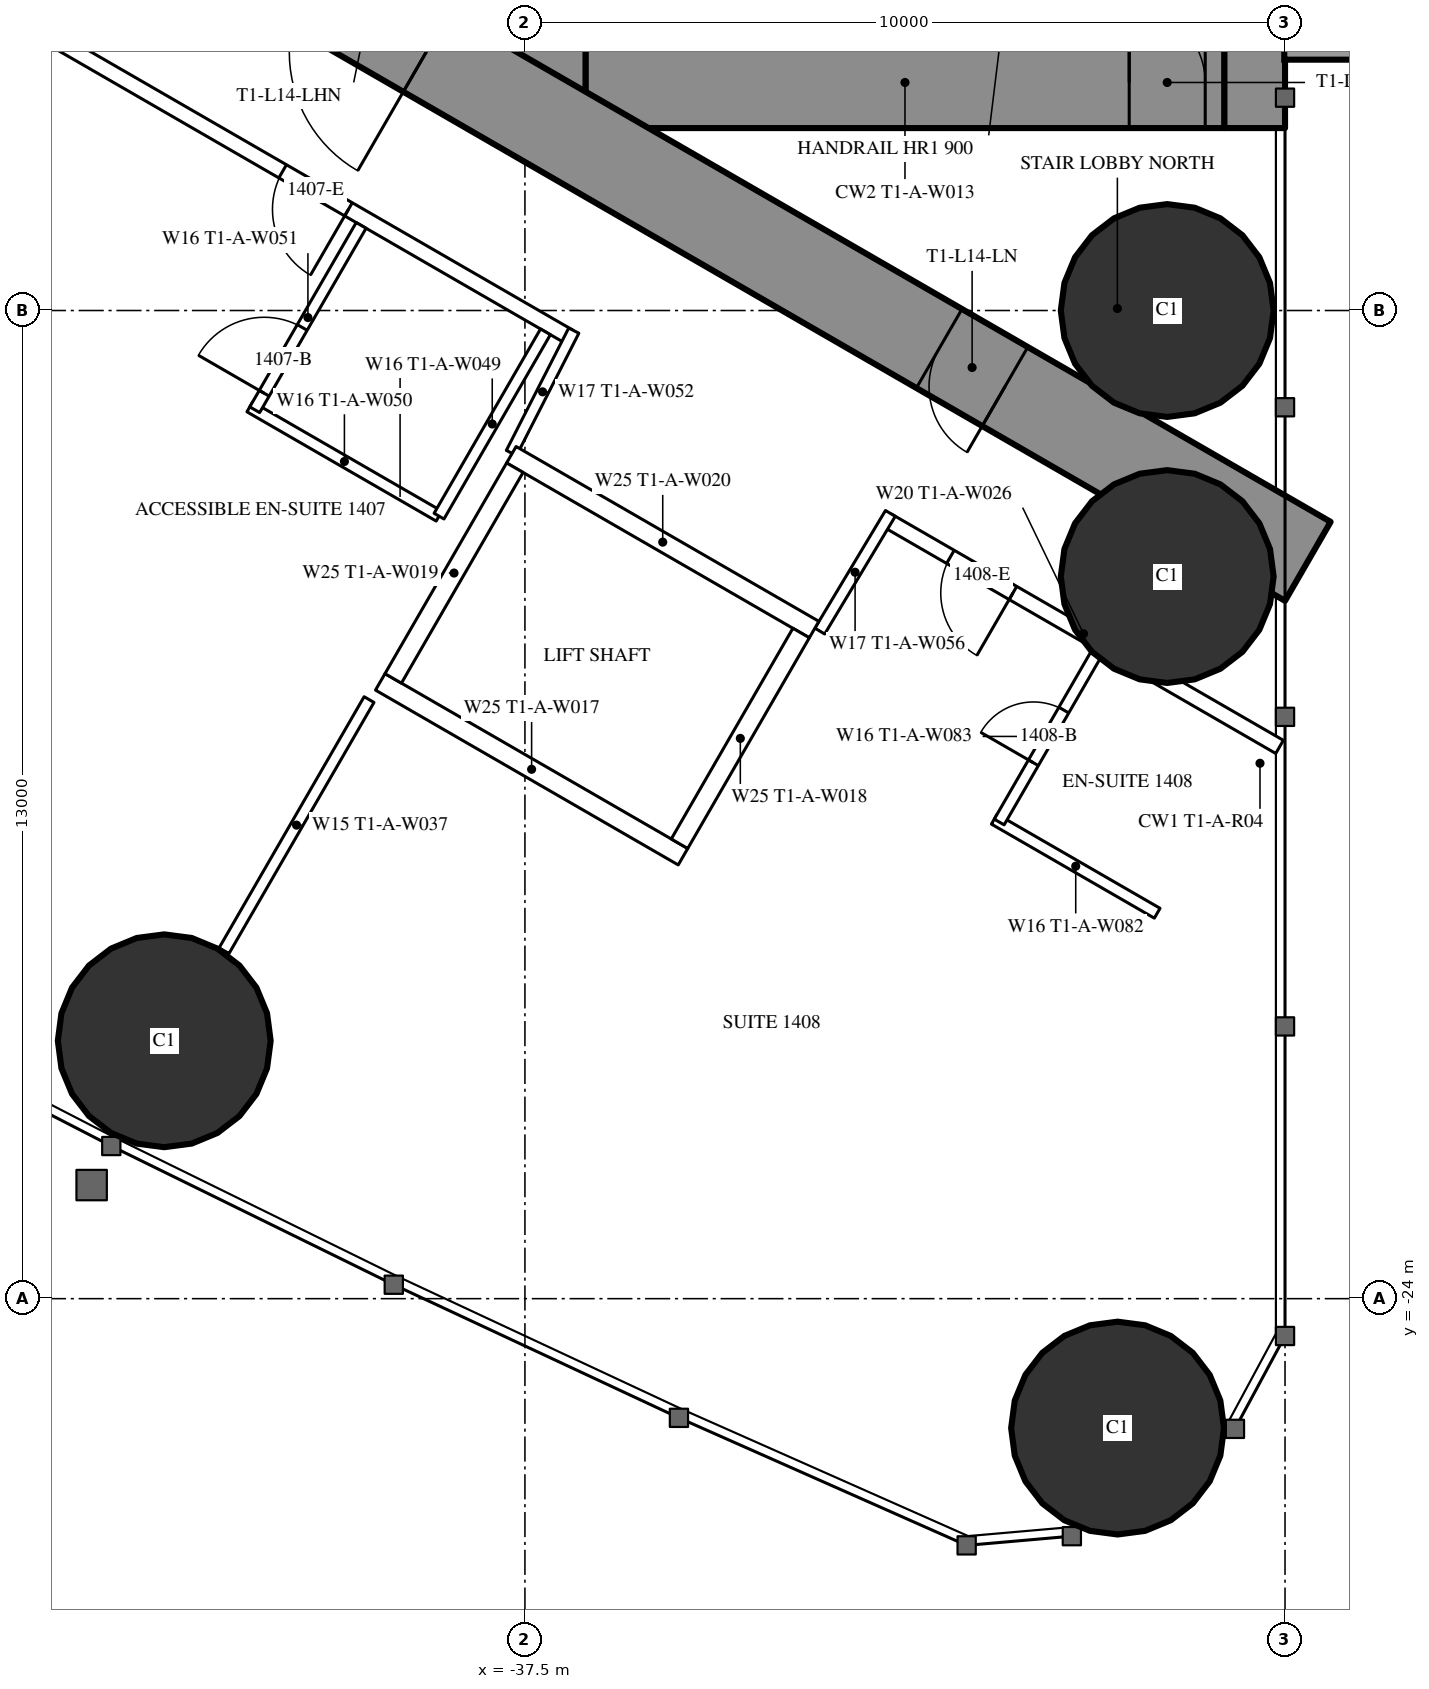
"""IFC4 building model, lengths in metres.
Left out: names, types, materials, properties, quantities, classifications, styles, units other than length and angle.
Written with IfcOpenShell. Run it as: python <this file> out.ifc"""

import sys

from ifc_helpers import new_model, si_unit, direction, frame, frame_2d, origin, origin_2d, place, context, subcontext, project, spatial, rectangle, hollow_circle, extrude, element, fill, save


model = new_model("IFC4")
c1 = context("Model", 3, precision=1e-05, world=origin(), true_north=direction((0.0, 1.0)))
c2 = subcontext(c1, "Body", "Model", "MODEL_VIEW")
j1 = project(units=[si_unit("LENGTHUNIT", "METRE"), si_unit("PLANEANGLEUNIT", "RADIAN")], contexts=[c1])
p1 = place(None, origin())
s1 = spatial("IfcSite", under=j1, at=p1, CompositionType="ELEMENT")
p2 = place(p1, origin())
s2 = spatial("IfcBuilding", under=s1, at=p2, CompositionType="ELEMENT")
p3 = place(p2, frame((0.0, 0.0, 56.5)))
s3 = spatial("IfcBuildingStorey", under=s2, at=p3, CompositionType="ELEMENT", Elevation=56.5)
for number, where, z_axis, x_axis in (
    (1, (-29.703, -25.703, 0.0), (0.0, 0.0, 1.0), (1.0, 0.0, 0.0)),
    (2, (-29.05, -11.0, 0.0), (0.0, 0.0, 1.0), (1.0, 0.0, 0.0)),
    (3, (-29.05, -14.5, 0.0), (0.0, 0.0, 1.0), (1.0, 0.0, 0.0)),
    (4, (-42.245, -20.607, 0.0), (0.0, 0.0, 1.0), (1.0, 0.0, 0.0)),
):
    element("IfcColumn", number, at=place(p3, frame(where, z_axis=z_axis, x_axis=x_axis)), inside=s3, PredefinedType="COLUMN", context=c2, shape_type="SweptSolid", body=[
        extrude(hollow_circle(Radius=1.4, WallThickness=0.12, at=origin_2d()), origin(), (0.0, 0.0, 1.0), 3.5),
    ])
p4 = place(p3, frame((-27.9, 8.6, 0.0), z_axis=(0.0, 0.0, 1.0), x_axis=(0.0, -1.0, 0.0)))
e5 = element("IfcWall", 5, at=p4, inside=s3, PredefinedType="SHEAR", context=c2, shape_type="SweptSolid", body=[
    extrude(rectangle(XDim=17.2, YDim=0.8, at=frame_2d((8.6, 0.0))), origin(), (0.0, 0.0, 1.0), 3.5),
])
p5 = place(p4, frame((2.45, 0.0, 0.6)))
e6 = element("IfcOpeningElement", 6, at=p5, cuts=e5, PredefinedType="OPENING", context=c2, shape_type="SweptSolid", body=[
    extrude(rectangle(XDim=0.6, YDim=2.1, at=frame_2d((0.3, 1.05))), frame((0.0, 0.41, 0.0), z_axis=(0.0, -1.0, 0.0), x_axis=(1.0, 0.0, 0.0)), (0.0, 0.0, 1.0), 0.82),
])
p6 = place(p4, frame((14.15, 0.0, 0.6)))
e7 = element("IfcOpeningElement", 7, at=p6, cuts=e5, PredefinedType="OPENING", context=c2, shape_type="SweptSolid", body=[
    extrude(rectangle(XDim=0.6, YDim=2.1, at=frame_2d((0.3, 1.05))), frame((0.0, 0.41, 0.0), z_axis=(0.0, -1.0, 0.0), x_axis=(1.0, 0.0, 0.0)), (0.0, 0.0, 1.0), 0.82),
])
p7 = place(p3, frame((-37.3, 8.6, 0.0), z_axis=(0.0, 0.0, 1.0), x_axis=(0.0, -1.0, 0.0)))
e8 = element("IfcWall", 8, at=p7, inside=s3, PredefinedType="SHEAR", context=c2, shape_type="SweptSolid", body=[
    extrude(rectangle(XDim=17.2, YDim=1.2, at=frame_2d((8.6, 0.0))), origin(), (0.0, 0.0, 1.0), 3.5),
])
p8 = place(p7, frame((7.7, 0.0, 0.0)))
e9 = element("IfcOpeningElement", 9, at=p8, cuts=e8, PredefinedType="OPENING", context=c2, shape_type="SweptSolid", body=[
    extrude(rectangle(XDim=1.8, YDim=2.2, at=frame_2d((0.9, 1.1))), frame((0.0, 0.61, 0.0), z_axis=(0.0, -1.0, 0.0), x_axis=(1.0, 0.0, 0.0)), (0.0, 0.0, 1.0), 1.22),
])
p9 = place(p3, frame((-28.3, -8.0, 0.0), z_axis=(0.0, 0.0, 1.0), x_axis=(-1.0, 0.0, 0.0)))
e10 = element("IfcWall", 10, at=p9, inside=s3, PredefinedType="SHEAR", context=c2, shape_type="SweptSolid", body=[
    extrude(rectangle(XDim=8.4, YDim=1.2, at=frame_2d((4.2, 0.0))), origin(), (0.0, 0.0, 1.0), 3.5),
])
p10 = place(p9, frame((0.25, 0.0, 0.0)))
e11 = element("IfcOpeningElement", 11, at=p10, cuts=e10, PredefinedType="OPENING", context=c2, shape_type="SweptSolid", body=[
    extrude(rectangle(XDim=1.0, YDim=2.2, at=frame_2d((0.5, 1.1))), frame((0.0, 0.61, 0.0), z_axis=(0.0, -1.0, 0.0), x_axis=(1.0, 0.0, 0.0)), (0.0, 0.0, 1.0), 1.22),
])
p11 = place(p3, frame((-27.2, -14.3, 0.0), z_axis=(0.0, 0.0, 1.0), x_axis=(-0.866024021859, 0.500002393557, 0.0)))
e12 = element("IfcWall", 12, at=p11, inside=s3, PredefinedType="SHEAR", context=c2, shape_type="SweptSolid", body=[
    extrude(rectangle(XDim=27.907, YDim=1.2, at=frame_2d((13.954, 0.0))), origin(), (0.0, 0.0, 1.0), 3.5),
])
p12 = place(p11, frame((4.6, 0.0, 0.0)))
e13 = element("IfcOpeningElement", 13, at=p12, cuts=e12, PredefinedType="OPENING", context=c2, shape_type="SweptSolid", body=[
    extrude(rectangle(XDim=1.0, YDim=2.2, at=frame_2d((0.5, 1.1))), frame((0.0, 0.61, 0.0), z_axis=(0.0, -1.0, 0.0), x_axis=(1.0, 0.0, 0.0)), (0.0, 0.0, 1.0), 1.22),
])
p13 = place(p11, frame((13.395, 0.0, 0.0)))
e14 = element("IfcOpeningElement", 14, at=p13, cuts=e12, PredefinedType="OPENING", context=c2, shape_type="SweptSolid", body=[
    extrude(rectangle(XDim=1.8, YDim=2.2, at=frame_2d((0.9, 1.1))), frame((0.0, 0.61, 0.0), z_axis=(0.0, -1.0, 0.0), x_axis=(1.0, 0.0, 0.0)), (0.0, 0.0, 1.0), 1.22),
])
p14 = place(p3, frame((-39.551, -16.118, 0.0), z_axis=(0.0, 0.0, 1.0), x_axis=(-0.499986503906, -0.866033195618, 0.0)))
e15 = element("IfcWall", 15, at=p14, inside=s3, PredefinedType="PARTITIONING", context=c2, shape_type="SweptSolid", body=[
    extrude(rectangle(XDim=3.815, YDim=0.15, at=frame_2d((1.907, 0.0))), origin(), (0.0, 0.0, 1.0), 3.25),
])
p15 = place(p3, frame((-27.572, -16.741, 0.0), z_axis=(0.0, 0.0, 1.0), x_axis=(-0.866024464444, 0.500001626982, 0.0)))
e16 = element("IfcWall", 16, at=p15, inside=s3, PredefinedType="PARTITIONING", context=c2, shape_type="SweptSolid", body=[
    extrude(rectangle(XDim=5.955, YDim=0.2, at=frame_2d((2.978, 0.0))), origin(), (0.0, 0.0, 1.0), 3.25),
])
p16 = place(p15, frame((4.05, 0.0, 0.0)))
e17 = element("IfcOpeningElement", 17, at=p16, cuts=e16, PredefinedType="OPENING", context=c2, shape_type="SweptSolid", body=[
    extrude(rectangle(XDim=0.95, YDim=2.2, at=frame_2d((0.475, 1.1))), frame((0.0, 0.11, 0.0), z_axis=(0.0, -1.0, 0.0), x_axis=(1.0, 0.0, 0.0)), (0.0, 0.0, 1.0), 0.22),
])
p17 = place(p3, frame((-36.92, -11.344, 0.0), z_axis=(0.0, 0.0, 1.0), x_axis=(-0.866028313256, 0.499994960614, 0.0)))
e18 = element("IfcWall", 18, at=p17, inside=s3, PredefinedType="PARTITIONING", context=c2, shape_type="SweptSolid", body=[
    extrude(rectangle(XDim=22.568, YDim=0.2, at=frame_2d((11.284, 0.0))), origin(), (0.0, 0.0, 1.0), 3.25),
])
p18 = place(p17, frame((12.68, 0.0, 0.0)))
e19 = element("IfcOpeningElement", 19, at=p18, cuts=e18, PredefinedType="OPENING", context=c2, shape_type="SweptSolid", body=[
    extrude(rectangle(XDim=0.95, YDim=2.2, at=frame_2d((0.475, 1.1))), frame((0.0, 0.11, 0.0), z_axis=(0.0, -1.0, 0.0), x_axis=(1.0, 0.0, 0.0)), (0.0, 0.0, 1.0), 0.22),
])
p19 = place(p17, frame((3.35, 0.0, 0.0)))
e20 = element("IfcOpeningElement", 20, at=p19, cuts=e18, PredefinedType="OPENING", context=c2, shape_type="SweptSolid", body=[
    extrude(rectangle(XDim=1.0, YDim=2.2, at=frame_2d((0.5, 1.1))), frame((0.0, 0.11, 0.0), z_axis=(0.0, -1.0, 0.0), x_axis=(1.0, 0.0, 0.0)), (0.0, 0.0, 1.0), 0.22),
])
p20 = place(p3, frame((-36.857, -11.265, 0.0), z_axis=(0.0, 0.0, 1.0), x_axis=(-0.454225294761, -0.890886851176, 0.0)))
e21 = element("IfcWall", 21, at=p20, inside=s3, PredefinedType="PARTITIONING", context=c2, shape_type="SweptSolid", body=[
    extrude(rectangle(XDim=1.807, YDim=0.15, at=frame_2d((0.904, 0.0))), origin(), (0.0, 0.0, 1.0), 3.25),
])
p21 = place(p3, frame((-33.621, -15.218, 0.0), z_axis=(0.0, 0.0, 1.0), x_axis=(0.514336634837, 0.857588377991, 0.0)))
e22 = element("IfcWall", 22, at=p21, inside=s3, PredefinedType="PARTITIONING", context=c2, shape_type="SweptSolid", body=[
    extrude(rectangle(XDim=1.805, YDim=0.15, at=frame_2d((0.903, 0.0))), origin(), (0.0, 0.0, 1.0), 3.25),
])
p22 = place(p3, frame((-38.63, -13.705, 0.0), z_axis=(0.0, 0.0, 1.0), x_axis=(-0.866018712932, 0.500011588718, 0.0)))
e23 = element("IfcWall", 23, at=p22, inside=s3, PredefinedType="PARTITIONING", context=c2, shape_type="SweptSolid", body=[
    extrude(rectangle(XDim=2.875, YDim=0.15, at=frame_2d((1.438, 0.0))), origin(), (0.0, 0.0, 1.0), 3.25),
])
p23 = place(p3, frame((-39.655, -9.88, 0.0), z_axis=(0.0, 0.0, 1.0), x_axis=(-0.500049511043, -0.865996816683, 0.0)))
e24 = element("IfcWall", 24, at=p23, inside=s3, PredefinedType="PARTITIONING", context=c2, shape_type="SweptSolid", body=[
    extrude(rectangle(XDim=2.8, YDim=0.15, at=frame_2d((1.4, 0.0))), origin(), (0.0, 0.0, 1.0), 3.25),
])
p24 = place(p23, frame((1.55, 0.0, 0.0)))
e25 = element("IfcOpeningElement", 25, at=p24, cuts=e24, PredefinedType="OPENING", context=c2, shape_type="SweptSolid", body=[
    extrude(rectangle(XDim=1.0, YDim=2.2, at=frame_2d((0.5, 1.1))), frame((0.0, 0.085, 0.0), z_axis=(0.0, -1.0, 0.0), x_axis=(1.0, 0.0, 0.0)), (0.0, 0.0, 1.0), 0.17),
])
p25 = place(p3, frame((-37.23, -11.281, 0.0), z_axis=(0.0, 0.0, 1.0), x_axis=(-0.500049511043, -0.865996816683, 0.0)))
e26 = element("IfcWall", 26, at=p25, inside=s3, PredefinedType="PARTITIONING", context=c2, shape_type="SweptSolid", body=[
    extrude(rectangle(XDim=2.8, YDim=0.15, at=frame_2d((1.4, 0.0))), origin(), (0.0, 0.0, 1.0), 3.25),
])
p26 = place(p3, frame((-29.182, -18.929, 0.0), z_axis=(0.0, 0.0, 1.0), x_axis=(-0.866006523861, 0.500032699561, 0.0)))
e27 = element("IfcWall", 27, at=p26, inside=s3, PredefinedType="PARTITIONING", context=c2, shape_type="SweptSolid", body=[
    extrude(rectangle(XDim=2.475, YDim=0.15, at=frame_2d((1.237, 0.0))), origin(), (0.0, 0.0, 1.0), 3.25),
])
p27 = place(p3, frame((-29.96, -15.478, 0.0), z_axis=(0.0, 0.0, 1.0), x_axis=(-0.500006934395, -0.866021400173, 0.0)))
e28 = element("IfcWall", 28, at=p27, inside=s3, PredefinedType="PARTITIONING", context=c2, shape_type="SweptSolid", body=[
    extrude(rectangle(XDim=2.6, YDim=0.15, at=frame_2d((1.3, 0.0))), origin(), (0.0, 0.0, 1.0), 3.25),
])
p28 = place(p27, frame((0.9, 0.0, 0.0)))
e29 = element("IfcOpeningElement", 29, at=p28, cuts=e28, PredefinedType="OPENING", context=c2, shape_type="SweptSolid", body=[
    extrude(rectangle(XDim=0.8, YDim=2.2, at=frame_2d((0.4, 1.1))), frame((0.0, 0.085, 0.0), z_axis=(0.0, -1.0, 0.0), x_axis=(1.0, 0.0, 0.0)), (0.0, 0.0, 1.0), 0.17),
])
p29 = place(p3, frame((-33.696, -15.197, 0.0), z_axis=(0.0, 0.0, 1.0), x_axis=(-0.865976953817, 0.500083908417, 0.0)))
e30 = element("IfcWall", 30, at=p29, inside=s3, PredefinedType="PARTITIONING", context=c2, shape_type="SweptSolid", body=[
    extrude(rectangle(XDim=4.599, YDim=0.25, at=frame_2d((2.3, 0.0))), origin(), (0.0, 0.0, 1.0), 3.25),
])
p30 = place(p3, frame((-35.42, -18.186, 0.0), z_axis=(0.0, 0.0, 1.0), x_axis=(-0.865990227814, 0.50006092162, 0.0)))
e31 = element("IfcWall", 31, at=p30, inside=s3, PredefinedType="PARTITIONING", context=c2, shape_type="SweptSolid", body=[
    extrude(rectangle(XDim=4.6, YDim=0.25, at=frame_2d((2.3, 0.0))), origin(), (0.0, 0.0, 1.0), 3.25),
])
p31 = place(p3, frame((-33.866, -15.243, 0.0), z_axis=(0.0, 0.0, 1.0), x_axis=(-0.499929347863, -0.866066190972, 0.0)))
e32 = element("IfcWall", 32, at=p31, inside=s3, PredefinedType="PARTITIONING", context=c2, shape_type="SweptSolid", body=[
    extrude(rectangle(XDim=3.201, YDim=0.25, at=frame_2d((1.6, 0.0))), origin(), (0.0, 0.0, 1.0), 3.25),
])
p32 = place(p3, frame((-37.633, -13.068, 0.0), z_axis=(0.0, 0.0, 1.0), x_axis=(-0.499872130319, -0.866099216793, 0.0)))
e33 = element("IfcWall", 33, at=p32, inside=s3, PredefinedType="PARTITIONING", context=c2, shape_type="SweptSolid", body=[
    extrude(rectangle(XDim=3.2, YDim=0.25, at=frame_2d((1.6, 0.0))), origin(), (0.0, 0.0, 1.0), 3.25),
])
p33 = place(p24, origin())
e34 = element("IfcDoor", 34, at=p33, inside=s3, OperationType="SINGLE_SWING_RIGHT", PredefinedType="DOOR", context=c2, shape_type="SweptSolid", body=[
    extrude(rectangle(XDim=1.0, YDim=2.2, at=frame_2d((0.5, 1.1))), frame((0.0, 0.025, 0.0), z_axis=(0.0, -1.0, 0.0), x_axis=(1.0, 0.0, 0.0)), (0.0, 0.0, 1.0), 0.05),
])
fill(e25, e34)
p34 = place(p19, origin())
e35 = element("IfcDoor", 35, at=p34, inside=s3, OperationType="SINGLE_SWING_LEFT", PredefinedType="DOOR", context=c2, shape_type="SweptSolid", body=[
    extrude(rectangle(XDim=1.0, YDim=2.2, at=frame_2d((0.5, 1.1))), frame((0.0, 0.025, 0.0), z_axis=(0.0, -1.0, 0.0), x_axis=(1.0, 0.0, 0.0)), (0.0, 0.0, 1.0), 0.05),
])
fill(e20, e35)
p35 = place(p28, origin())
e36 = element("IfcDoor", 36, at=p35, inside=s3, OperationType="SINGLE_SWING_RIGHT", PredefinedType="DOOR", context=c2, shape_type="SweptSolid", body=[
    extrude(rectangle(XDim=0.8, YDim=2.2, at=frame_2d((0.4, 1.1))), frame((0.0, 0.025, 0.0), z_axis=(0.0, -1.0, 0.0), x_axis=(1.0, 0.0, 0.0)), (0.0, 0.0, 1.0), 0.05),
])
fill(e29, e36)
p36 = place(p16, origin())
e37 = element("IfcDoor", 37, at=p36, inside=s3, OperationType="SINGLE_SWING_LEFT", PredefinedType="DOOR", context=c2, shape_type="SweptSolid", body=[
    extrude(rectangle(XDim=0.95, YDim=2.2, at=frame_2d((0.475, 1.1))), frame((0.0, 0.025, 0.0), z_axis=(0.0, -1.0, 0.0), x_axis=(1.0, 0.0, 0.0)), (0.0, 0.0, 1.0), 0.05),
])
fill(e17, e37)
p37 = place(p12, origin())
e38 = element("IfcDoor", 38, at=p37, inside=s3, OperationType="SINGLE_SWING_LEFT", PredefinedType="DOOR", context=c2, shape_type="SweptSolid", body=[
    extrude(rectangle(XDim=1.0, YDim=2.2, at=frame_2d((0.5, 1.1))), frame((0.0, 0.025, 0.0), z_axis=(0.0, -1.0, 0.0), x_axis=(1.0, 0.0, 0.0)), (0.0, 0.0, 1.0), 0.05),
])
fill(e13, e38)
p38 = place(p13, origin())
e39 = element("IfcDoor", 39, at=p38, inside=s3, OperationType="DOUBLE_DOOR_SINGLE_SWING", PredefinedType="DOOR", context=c2, shape_type="SweptSolid", body=[
    extrude(rectangle(XDim=1.8, YDim=2.2, at=frame_2d((0.9, 1.1))), frame((0.0, 0.025, 0.0), z_axis=(0.0, -1.0, 0.0), x_axis=(1.0, 0.0, 0.0)), (0.0, 0.0, 1.0), 0.05),
])
fill(e14, e39)
p39 = place(p10, origin())
e40 = element("IfcDoor", 40, at=p39, inside=s3, OperationType="SINGLE_SWING_RIGHT", PredefinedType="DOOR", context=c2, shape_type="SweptSolid", body=[
    extrude(rectangle(XDim=1.0, YDim=2.2, at=frame_2d((0.5, 1.1))), frame((0.0, 0.025, 0.0), z_axis=(0.0, -1.0, 0.0), x_axis=(1.0, 0.0, 0.0)), (0.0, 0.0, 1.0), 0.05),
])
fill(e11, e40)
save(model, sys.argv[1])
